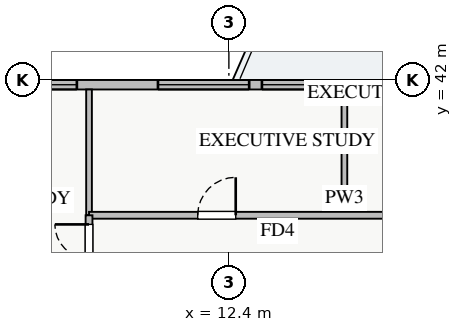
"""IFC4 building model, lengths in metres.
Left out: names, types, materials, properties, quantities, classifications, styles, units other than length and angle.
Written with IfcOpenShell. Run it as: python <this file> out.ifc"""

import sys

from ifc_helpers import new_model, si_unit, direction, frame, frame_2d, origin, place, context, subcontext, project, spatial, rectangle, extrude, source, transform, mapped, element, fill, save


model = new_model("IFC4")
c1 = context("Model", 3, precision=1e-05, world=origin(), true_north=direction((0.0, 1.0)))
c2 = subcontext(c1, "Body", "Model", "MODEL_VIEW")
j1 = project(units=[si_unit("LENGTHUNIT", "METRE"), si_unit("PLANEANGLEUNIT", "RADIAN")], contexts=[c1])
p1 = place(None, origin())
s1 = spatial("IfcSite", under=j1, at=p1, CompositionType="ELEMENT")
p2 = place(p1, origin())
s2 = spatial("IfcBuilding", under=s1, at=p2, CompositionType="ELEMENT")
p3 = place(p2, frame((0.0, 0.0, 39.25)))
s3 = spatial("IfcBuildingStorey", under=s2, at=p3, CompositionType="ELEMENT", Elevation=39.25)
p4 = place(p3, frame((5.45, 41.875, 0.0), z_axis=(0.0, 0.0, 1.0), x_axis=(1.0, 0.0, 0.0)))
e1 = element("IfcWall", 1, at=p4, inside=s3, PredefinedType="STANDARD", context=c2, shape_type="SweptSolid", body=[
    extrude(rectangle(XDim=27.1, YDim=0.25, at=frame_2d((13.55, 0.0))), origin(), (0.0, 0.0, 1.0), 2.61),
])
p5 = place(p4, frame((14.4, 0.0, 0.0)))
e2 = element("IfcOpeningElement", 2, at=p5, cuts=e1, PredefinedType="OPENING", context=c2, shape_type="SweptSolid", body=[
    extrude(rectangle(XDim=1.2, YDim=2.1, at=frame_2d((0.6, 1.05))), frame((0.0, 0.135, 0.0), z_axis=(0.0, -1.0, 0.0), x_axis=(1.0, 0.0, 0.0)), (0.0, 0.0, 1.0), 0.27),
])
p6 = place(p4, frame((1.45, 0.0, 0.9)))
e3 = element("IfcOpeningElement", 3, at=p6, cuts=e1, PredefinedType="OPENING", context=c2, shape_type="SweptSolid", body=[
    extrude(rectangle(XDim=1.5, YDim=1.5, at=frame_2d((0.75, 0.75))), frame((0.0, 0.135, 0.0), z_axis=(0.0, -1.0, 0.0), x_axis=(1.0, 0.0, 0.0)), (0.0, 0.0, 1.0), 0.27),
])
p7 = place(p4, frame((7.82, 0.0, 0.9)))
e4 = element("IfcOpeningElement", 4, at=p7, cuts=e1, PredefinedType="OPENING", context=c2, shape_type="SweptSolid", body=[
    extrude(rectangle(XDim=1.8, YDim=1.5, at=frame_2d((0.9, 0.75))), frame((0.0, 0.135, 0.0), z_axis=(0.0, -1.0, 0.0), x_axis=(1.0, 0.0, 0.0)), (0.0, 0.0, 1.0), 0.27),
])
p8 = place(p4, frame((17.92, 0.0, 0.9)))
e5 = element("IfcOpeningElement", 5, at=p8, cuts=e1, PredefinedType="OPENING", context=c2, shape_type="SweptSolid", body=[
    extrude(rectangle(XDim=1.5, YDim=1.5, at=frame_2d((0.75, 0.75))), frame((0.0, 0.135, 0.0), z_axis=(0.0, -1.0, 0.0), x_axis=(1.0, 0.0, 0.0)), (0.0, 0.0, 1.0), 0.27),
])
p9 = place(p4, frame((22.663, 0.0, 0.9)))
e6 = element("IfcOpeningElement", 6, at=p9, cuts=e1, PredefinedType="OPENING", context=c2, shape_type="SweptSolid", body=[
    extrude(rectangle(XDim=2.1, YDim=1.48, at=frame_2d((1.05, 0.74))), frame((0.0, 0.135, 0.0), z_axis=(0.0, -1.0, 0.0), x_axis=(1.0, 0.0, 0.0)), (0.0, 0.0, 1.0), 0.27),
])
p10 = place(p4, frame((5.084, 0.0, 0.9)))
e7 = element("IfcOpeningElement", 7, at=p10, cuts=e1, PredefinedType="OPENING", context=c2, shape_type="SweptSolid", body=[
    extrude(rectangle(XDim=2.4, YDim=1.5, at=frame_2d((1.2, 0.75))), frame((0.0, 0.135, 0.0), z_axis=(0.0, -1.0, 0.0), x_axis=(1.0, 0.0, 0.0)), (0.0, 0.0, 1.0), 0.27),
])
p11 = place(p4, frame((11.002, 0.0, 0.9)))
e8 = element("IfcOpeningElement", 8, at=p11, cuts=e1, PredefinedType="OPENING", context=c2, shape_type="SweptSolid", body=[
    extrude(rectangle(XDim=2.4, YDim=1.5, at=frame_2d((1.2, 0.75))), frame((0.0, 0.135, 0.0), z_axis=(0.0, -1.0, 0.0), x_axis=(1.0, 0.0, 0.0)), (0.0, 0.0, 1.0), 0.27),
])
for number, where, z_axis, x_axis in (
    (9, (15.44, 38.44, 0.0), (0.0, 0.0, 1.0), (0.0, 1.0, 0.0)),
    (10, (8.72, 38.44, 0.0), (0.0, 0.0, 1.0), (0.0, 1.0, 0.0)),
):
    element("IfcWall", number, at=place(p3, frame(where, z_axis=z_axis, x_axis=x_axis)), inside=s3, PredefinedType="PARTITIONING", context=c2, shape_type="SweptSolid", body=[
        extrude(rectangle(XDim=3.31, YDim=0.15, at=frame_2d((1.655, 0.0))), origin(), (0.0, 0.0, 1.0), 3.07),
    ])
p12 = place(p3, frame((8.72, 38.44, 0.0), z_axis=(0.0, 0.0, 1.0), x_axis=(1.0, 0.0, 0.0)))
e11 = element("IfcWall", 11, at=p12, inside=s3, PredefinedType="PARTITIONING", context=c2, shape_type="SweptSolid", body=[
    extrude(rectangle(XDim=23.63, YDim=0.18, at=frame_2d((11.815, 0.0))), origin(), (0.0, 0.0, 1.0), 3.07),
])
p13 = place(p12, frame((2.86, 0.0, 0.0)))
e12 = element("IfcOpeningElement", 12, at=p13, cuts=e11, PredefinedType="OPENING", context=c2, shape_type="SweptSolid", body=[
    extrude(rectangle(XDim=1.0, YDim=2.05, at=frame_2d((0.5, 1.025))), frame((0.0, 0.1, 0.0), z_axis=(0.0, -1.0, 0.0), x_axis=(1.0, 0.0, 0.0)), (0.0, 0.0, 1.0), 0.2),
])
p14 = place(p12, frame((9.4, 0.0, 0.0)))
e13 = element("IfcOpeningElement", 13, at=p14, cuts=e11, PredefinedType="OPENING", context=c2, shape_type="SweptSolid", body=[
    extrude(rectangle(XDim=1.0, YDim=2.05, at=frame_2d((0.5, 1.025))), frame((0.0, 0.1, 0.0), z_axis=(0.0, -1.0, 0.0), x_axis=(1.0, 0.0, 0.0)), (0.0, 0.0, 1.0), 0.2),
])
p15 = place(p12, frame((14.9, 0.0, 0.0)))
e14 = element("IfcOpeningElement", 14, at=p15, cuts=e11, PredefinedType="OPENING", context=c2, shape_type="SweptSolid", body=[
    extrude(rectangle(XDim=1.0, YDim=2.05, at=frame_2d((0.5, 1.025))), frame((0.0, 0.1, 0.0), z_axis=(0.0, -1.0, 0.0), x_axis=(1.0, 0.0, 0.0)), (0.0, 0.0, 1.0), 0.2),
])
p16 = place(p12, frame((20.175, 0.0, 0.0)))
e15 = element("IfcOpeningElement", 15, at=p16, cuts=e11, PredefinedType="OPENING", context=c2, shape_type="SweptSolid", body=[
    extrude(rectangle(XDim=1.0, YDim=2.05, at=frame_2d((0.5, 1.025))), frame((0.0, 0.1, 0.0), z_axis=(0.0, -1.0, 0.0), x_axis=(1.0, 0.0, 0.0)), (0.0, 0.0, 1.0), 0.2),
])
p17 = place(p3, frame((8.72, 7.21, 0.0), z_axis=(0.0, 0.0, 1.0), x_axis=(0.0, 1.0, 0.0)))
e16 = element("IfcWall", 16, at=p17, inside=s3, PredefinedType="PARTITIONING", context=c2, shape_type="SweptSolid", body=[
    extrude(rectangle(XDim=31.23, YDim=0.18, at=frame_2d((15.615, 0.0))), origin(), (0.0, 0.0, 1.0), 3.07),
])
p18 = place(p17, frame((30.09, 0.0, 0.0)))
e17 = element("IfcOpeningElement", 17, at=p18, cuts=e16, PredefinedType="OPENING", context=c2, shape_type="SweptSolid", body=[
    extrude(rectangle(XDim=0.9, YDim=2.05, at=frame_2d((0.45, 1.025))), frame((0.0, 0.1, 0.0), z_axis=(0.0, -1.0, 0.0), x_axis=(1.0, 0.0, 0.0)), (0.0, 0.0, 1.0), 0.2),
])
p19 = place(p17, frame((0.24, 0.0, 0.0)))
e18 = element("IfcOpeningElement", 18, at=p19, cuts=e16, PredefinedType="OPENING", context=c2, shape_type="SweptSolid", body=[
    extrude(rectangle(XDim=0.9, YDim=2.05, at=frame_2d((0.45, 1.025))), frame((0.0, 0.1, 0.0), z_axis=(0.0, -1.0, 0.0), x_axis=(1.0, 0.0, 0.0)), (0.0, 0.0, 1.0), 0.2),
])
p20 = place(p17, frame((5.265, 0.0, 0.0)))
e19 = element("IfcOpeningElement", 19, at=p20, cuts=e16, PredefinedType="OPENING", context=c2, shape_type="SweptSolid", body=[
    extrude(rectangle(XDim=1.0, YDim=2.05, at=frame_2d((0.5, 1.025))), frame((0.0, 0.1, 0.0), z_axis=(0.0, -1.0, 0.0), x_axis=(1.0, 0.0, 0.0)), (0.0, 0.0, 1.0), 0.2),
])
p21 = place(p17, frame((11.93, 0.0, 0.0)))
e20 = element("IfcOpeningElement", 20, at=p21, cuts=e16, PredefinedType="OPENING", context=c2, shape_type="SweptSolid", body=[
    extrude(rectangle(XDim=1.0, YDim=2.05, at=frame_2d((0.5, 1.025))), frame((0.0, 0.1, 0.0), z_axis=(0.0, -1.0, 0.0), x_axis=(1.0, 0.0, 0.0)), (0.0, 0.0, 1.0), 0.2),
])
p22 = place(p17, frame((21.96, 0.0, 0.0)))
e21 = element("IfcOpeningElement", 21, at=p22, cuts=e16, PredefinedType="OPENING", context=c2, shape_type="SweptSolid", body=[
    extrude(rectangle(XDim=1.0, YDim=2.05, at=frame_2d((0.5, 1.025))), frame((0.0, 0.1, 0.0), z_axis=(0.0, -1.0, 0.0), x_axis=(1.0, 0.0, 0.0)), (0.0, 0.0, 1.0), 0.2),
])
m1 = source(origin(), c2, "Body", "SweptSolid", [
    extrude(rectangle(XDim=1.5, YDim=1.5, at=frame_2d((0.75, 0.75))), frame((0.0, 0.03, 0.0), z_axis=(0.0, -1.0, 0.0), x_axis=(1.0, 0.0, 0.0)), (0.0, 0.0, 1.0), 0.06),
])
p23 = place(p6, origin())
e22 = element("IfcWindow", 22, at=p23, inside=s3, PartitioningType="TRIPLE_PANEL_VERTICAL", PredefinedType="WINDOW", context=c2, shape_type="MappedRepresentation", body=[
    mapped(m1, transform((0.0, 0.0, 0.0), x_axis=(1.0, 0.0, 0.0), y_axis=(0.0, 1.0, 0.0), z_axis=(0.0, 0.0, 1.0), scale=1.0)),
])
fill(e3, e22)
m2 = source(origin(), c2, "Body", "SweptSolid", [
    extrude(rectangle(XDim=1.8, YDim=1.5, at=frame_2d((0.9, 0.75))), frame((0.0, 0.03, 0.0), z_axis=(0.0, -1.0, 0.0), x_axis=(1.0, 0.0, 0.0)), (0.0, 0.0, 1.0), 0.06),
])
p24 = place(p7, origin())
e23 = element("IfcWindow", 23, at=p24, inside=s3, PartitioningType="DOUBLE_PANEL_VERTICAL", PredefinedType="WINDOW", context=c2, shape_type="MappedRepresentation", body=[
    mapped(m2, transform((0.0, 0.0, 0.0), x_axis=(1.0, 0.0, 0.0), y_axis=(0.0, 1.0, 0.0), z_axis=(0.0, 0.0, 1.0), scale=1.0)),
])
fill(e4, e23)
m3 = source(origin(), c2, "Body", "SweptSolid", [
    extrude(rectangle(XDim=1.0, YDim=2.05, at=frame_2d((0.5, 1.025))), frame((0.0, 0.025, 0.0), z_axis=(0.0, -1.0, 0.0), x_axis=(1.0, 0.0, 0.0)), (0.0, 0.0, 1.0), 0.05),
])
p25 = place(p13, origin())
e24 = element("IfcDoor", 24, at=p25, inside=s3, OperationType="SINGLE_SWING_RIGHT", PredefinedType="DOOR", context=c2, shape_type="MappedRepresentation", body=[
    mapped(m3, transform((0.0, 0.0, 0.0), x_axis=(1.0, 0.0, 0.0), y_axis=(0.0, 1.0, 0.0), z_axis=(0.0, 0.0, 1.0), scale=1.0)),
])
fill(e12, e24)
m4 = source(origin(), c2, "Body", "SweptSolid", [
    extrude(rectangle(XDim=0.9, YDim=2.05, at=frame_2d((0.45, 1.025))), frame((0.0, 0.025, 0.0), z_axis=(0.0, -1.0, 0.0), x_axis=(1.0, 0.0, 0.0)), (0.0, 0.0, 1.0), 0.05),
])
p26 = place(p18, origin())
e25 = element("IfcDoor", 25, at=p26, inside=s3, OperationType="SINGLE_SWING_RIGHT", PredefinedType="DOOR", context=c2, shape_type="MappedRepresentation", body=[
    mapped(m4, transform((0.0, 0.0, 0.0), x_axis=(1.0, 0.0, 0.0), y_axis=(0.0, 1.0, 0.0), z_axis=(0.0, 0.0, 1.0), scale=1.0)),
])
fill(e17, e25)
m5 = source(origin(), c2, "Body", "SweptSolid", [
    extrude(rectangle(XDim=2.4, YDim=1.5, at=frame_2d((1.2, 0.75))), frame((0.0, 0.03, 0.0), z_axis=(0.0, -1.0, 0.0), x_axis=(1.0, 0.0, 0.0)), (0.0, 0.0, 1.0), 0.06),
])
p27 = place(p10, origin())
e26 = element("IfcWindow", 26, at=p27, inside=s3, PartitioningType="TRIPLE_PANEL_VERTICAL", PredefinedType="WINDOW", context=c2, shape_type="MappedRepresentation", body=[
    mapped(m5, transform((0.0, 0.0, 0.0), x_axis=(1.0, 0.0, 0.0), y_axis=(0.0, 1.0, 0.0), z_axis=(0.0, 0.0, 1.0), scale=1.0)),
])
fill(e7, e26)
save(model, sys.argv[1])
